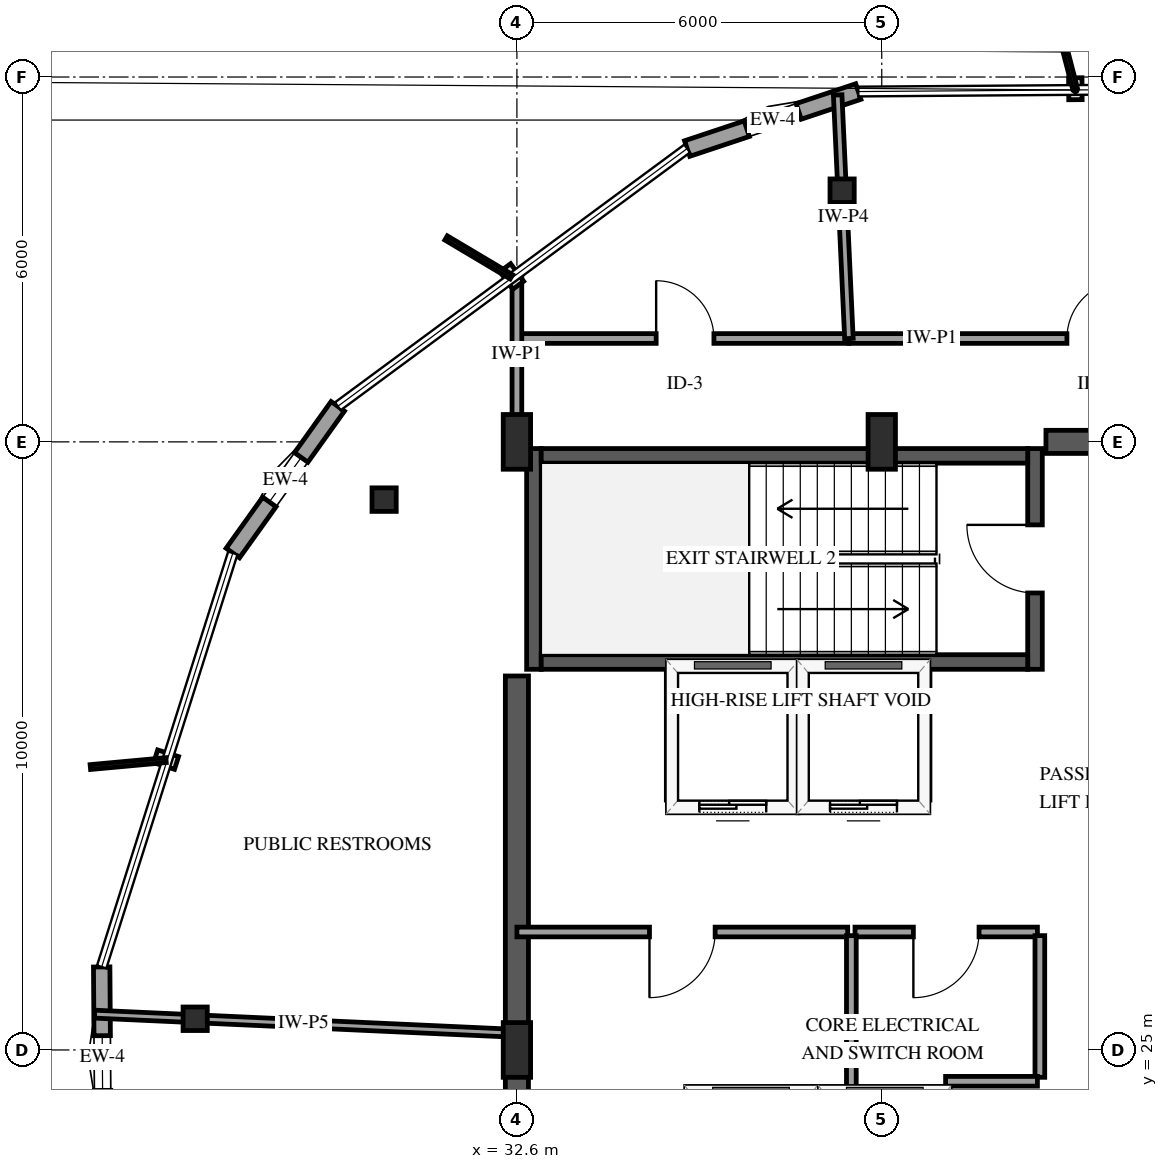
"""IFC4 building model, lengths in metres.
Left out: names, types, materials, properties, quantities, classifications, styles, units other than length and angle.
Written with IfcOpenShell. Run it as: python <this file> out.ifc"""

import sys

from ifc_helpers import new_model, si_unit, direction, frame, frame_2d, origin, origin_2d, place, context, subcontext, project, spatial, rectangle, i_section, extrude, element, fill, save


model = new_model("IFC4")
c1 = context("Model", 3, precision=1e-05, world=origin(), true_north=direction((0.0, 1.0)))
c2 = subcontext(c1, "Body", "Model", "MODEL_VIEW")
j1 = project(units=[si_unit("LENGTHUNIT", "METRE"), si_unit("PLANEANGLEUNIT", "RADIAN")], contexts=[c1])
p1 = place(None, origin())
s1 = spatial("IfcSite", under=j1, at=p1, CompositionType="ELEMENT")
p2 = place(p1, origin())
s2 = spatial("IfcBuilding", under=s1, at=p2, CompositionType="ELEMENT")
p3 = place(p2, frame((0.0, 0.0, 301.45)))
s3 = spatial("IfcBuildingStorey", under=s2, at=p3, CompositionType="ELEMENT", Elevation=301.45)
p4 = place(p3, frame((32.88, 31.26, 0.0), z_axis=(0.0, 0.0, 1.0), x_axis=(0.0, 1.0, 0.0)))
e1 = element("IfcWall", 1, at=p4, inside=s3, PredefinedType="SHEAR", context=c2, shape_type="SweptSolid", body=[
    extrude(rectangle(XDim=3.63, YDim=0.24, at=frame_2d((1.815, 0.0))), origin(), (0.0, 0.0, 1.0), 4.2),
])
p5 = place(p3, frame((41.12, 31.26, 0.0), z_axis=(0.0, 0.0, 1.0), x_axis=(0.0, 1.0, 0.0)))
e2 = element("IfcWall", 2, at=p5, inside=s3, PredefinedType="SHEAR", context=c2, shape_type="SweptSolid", body=[
    extrude(rectangle(XDim=3.63, YDim=0.24, at=frame_2d((1.815, 0.0))), origin(), (0.0, 0.0, 1.0), 4.2),
])
p6 = place(p5, frame((1.255, 0.0, 0.0)))
e3 = element("IfcOpeningElement", 3, at=p6, cuts=e2, PredefinedType="OPENING", context=c2, shape_type="SweptSolid", body=[
    extrude(rectangle(XDim=1.12, YDim=2.15, at=frame_2d((0.56, 1.075))), frame((0.0, 0.13, 0.0), z_axis=(0.0, -1.0, 0.0), x_axis=(1.0, 0.0, 0.0)), (0.0, 0.0, 1.0), 0.26),
])
for number, where, z_axis, x_axis in (
    (4, (33.0, 31.38, 0.0), (0.0, 0.0, 1.0), (1.0, 0.0, 0.0)),
    (5, (33.0, 34.77, 0.0), (0.0, 0.0, 1.0), (1.0, 0.0, 0.0)),
):
    element("IfcWall", number, at=place(p3, frame(where, z_axis=z_axis, x_axis=x_axis)), inside=s3, PredefinedType="SHEAR", context=c2, shape_type="SweptSolid", body=[
        extrude(rectangle(XDim=8.0, YDim=0.24, at=frame_2d((4.0, 0.0))), origin(), (0.0, 0.0, 1.0), 4.2),
    ])
p7 = place(p3, frame((32.6, 18.85, 0.0), z_axis=(0.0, 0.0, 1.0), x_axis=(0.0, 1.0, 0.0)))
e6 = element("IfcWall", 6, at=p7, inside=s3, PredefinedType="SHEAR", context=c2, shape_type="SweptSolid", body=[
    extrude(rectangle(XDim=12.3, YDim=0.38, at=frame_2d((6.15, 0.0))), origin(), (0.0, 0.0, 1.0), 4.2),
])
p8 = place(p3, frame((41.3, 35.0, 0.0), z_axis=(0.0, 0.0, 1.0), x_axis=(1.0, 0.0, 0.0)))
e7 = element("IfcWall", 7, at=p8, inside=s3, PredefinedType="SHEAR", context=c2, shape_type="SweptSolid", body=[
    extrude(rectangle(XDim=2.85, YDim=0.38, at=frame_2d((1.425, 0.0))), origin(), (0.0, 0.0, 1.0), 4.2),
])
for number, where, z_axis, x_axis in (
    (8, (32.6, 25.0, 0.0), (0.0, 0.0, 1.0), (1.0, 0.0, 0.0)),
    (9, (32.6, 35.0, 0.0), (0.0, 0.0, 1.0), (1.0, 0.0, 0.0)),
    (10, (38.6, 35.0, 0.0), (0.0, 0.0, 1.0), (1.0, 0.0, 0.0)),
):
    element("IfcColumn", number, at=place(p3, frame(where, z_axis=z_axis, x_axis=x_axis)), inside=s3, PredefinedType="PILASTER", context=c2, shape_type="SweptSolid", body=[
        extrude(rectangle(XDim=0.45, YDim=0.9, at=origin_2d()), origin(), (0.0, 0.0, 1.0), 4.2),
    ])
for number, where, z_axis, x_axis in (
    (11, (37.948, 39.131, 0.0), (0.0, 0.0, 1.0), (1.0, 0.0, 0.0)),
    (12, (30.416, 34.05, 0.0), (0.0, 0.0, 1.0), (1.0, 0.0, 0.0)),
    (13, (27.309, 25.513, 0.0), (0.0, 0.0, 1.0), (1.0, 0.0, 0.0)),
):
    element("IfcColumn", number, at=place(p3, frame(where, z_axis=z_axis, x_axis=x_axis)), inside=s3, PredefinedType="COLUMN", context=c2, shape_type="SweptSolid", body=[
        extrude(i_section(OverallWidth=0.398, OverallDepth=0.387, WebThickness=0.021, FlangeThickness=0.033, FilletRadius=0.038, at=origin_2d()), origin(), (0.0, 0.0, 1.0), 4.2),
    ])
p9 = place(p3, frame((38.214, 40.761, 0.0), z_axis=(0.0, 0.0, 1.0), x_axis=(-0.948757335835, -0.31600556593, 0.0)))
e14 = element("IfcWall", 14, at=p9, inside=s3, PredefinedType="SOLIDWALL", context=c2, shape_type="SweptSolid", body=[
    extrude(rectangle(XDim=2.967, YDim=0.27, at=frame_2d((1.483, 0.0))), origin(), (0.0, 0.0, 1.0), 3.274),
])
p10 = place(p9, frame((1.033, 0.0, 0.75)))
e15 = element("IfcOpeningElement", 15, at=p10, cuts=e14, PredefinedType="OPENING", context=c2, shape_type="SweptSolid", body=[
    extrude(rectangle(XDim=0.9, YDim=1.5, at=frame_2d((0.45, 0.75))), frame((0.0, 0.145, 0.0), z_axis=(0.0, -1.0, 0.0), x_axis=(1.0, 0.0, 0.0)), (0.0, 0.0, 1.0), 0.29),
])
p11 = place(p3, frame((29.654, 35.584, 0.0), z_axis=(0.0, 0.0, 1.0), x_axis=(-0.581915266528, -0.813249422122, 0.0)))
e16 = element("IfcWall", 16, at=p11, inside=s3, PredefinedType="SOLIDWALL", context=c2, shape_type="SweptSolid", body=[
    extrude(rectangle(XDim=2.967, YDim=0.27, at=frame_2d((1.483, 0.0))), origin(), (0.0, 0.0, 1.0), 3.274),
])
p12 = place(p11, frame((1.033, 0.0, 0.75)))
e17 = element("IfcOpeningElement", 17, at=p12, cuts=e16, PredefinedType="OPENING", context=c2, shape_type="SweptSolid", body=[
    extrude(rectangle(XDim=0.9, YDim=1.5, at=frame_2d((0.45, 0.75))), frame((0.0, 0.145, 0.0), z_axis=(0.0, -1.0, 0.0), x_axis=(1.0, 0.0, 0.0)), (0.0, 0.0, 1.0), 0.29),
])
p13 = place(p3, frame((25.771, 26.365, 0.0), z_axis=(0.0, 0.0, 1.0), x_axis=(0.007324906367, -0.999973172514, 0.0)))
e18 = element("IfcWall", 18, at=p13, inside=s3, PredefinedType="SOLIDWALL", context=c2, shape_type="SweptSolid", body=[
    extrude(rectangle(XDim=2.966, YDim=0.27, at=frame_2d((1.483, 0.0))), origin(), (0.0, 0.0, 1.0), 3.274),
])
p14 = place(p13, frame((1.131, 0.0, 0.75)))
e19 = element("IfcOpeningElement", 19, at=p14, cuts=e18, PredefinedType="OPENING", context=c2, shape_type="SweptSolid", body=[
    extrude(rectangle(XDim=0.9, YDim=1.5, at=frame_2d((0.45, 0.75))), frame((0.0, 0.145, 0.0), z_axis=(0.0, -1.0, 0.0), x_axis=(1.0, 0.0, 0.0)), (0.0, 0.0, 1.0), 0.29),
])
for number, where, z_axis, x_axis in (
    (20, (35.45, 24.3, 0.0), (0.0, 0.0, 1.0), (1.0, 0.0, 0.0)),
    (21, (37.65, 24.3, 0.0), (0.0, 0.0, 1.0), (1.0, 0.0, 0.0)),
):
    element("IfcWall", number, at=place(p3, frame(where, z_axis=z_axis, x_axis=x_axis)), inside=s3, PredefinedType="SOLIDWALL", context=c2, shape_type="SweptSolid", body=[
        extrude(rectangle(XDim=2.0, YDim=0.185, at=frame_2d((1.0, 0.0))), origin(), (0.0, 0.0, 1.0), 3.895),
    ])
p15 = place(p3, frame((35.15, 29.0, 0.0), z_axis=(0.0, 0.0, 1.0), x_axis=(1.0, 0.0, 0.0)))
e22 = element("IfcWall", 22, at=p15, inside=s3, PredefinedType="SOLIDWALL", context=c2, shape_type="SweptSolid", body=[
    extrude(rectangle(XDim=2.0, YDim=0.185, at=frame_2d((1.0, 0.0))), origin(), (0.0, 0.0, 1.0), 3.895),
])
p16 = place(p15, frame((0.45, 0.0, 0.0)))
e23 = element("IfcOpeningElement", 23, at=p16, cuts=e22, PredefinedType="OPENING", context=c2, shape_type="SweptSolid", body=[
    extrude(rectangle(XDim=1.1, YDim=2.15, at=frame_2d((0.55, 1.075))), frame((0.0, 0.103, 0.0), z_axis=(0.0, -1.0, 0.0), x_axis=(1.0, 0.0, 0.0)), (0.0, 0.0, 1.0), 0.205),
])
for number, where, z_axis, x_axis in (
    (24, (35.15, 29.11, 0.0), (0.0, 0.0, 1.0), (0.0, 1.0, 0.0)),
    (25, (37.15, 29.11, 0.0), (0.0, 0.0, 1.0), (0.0, 1.0, 0.0)),
):
    element("IfcWall", number, at=place(p3, frame(where, z_axis=z_axis, x_axis=x_axis)), inside=s3, PredefinedType="SOLIDWALL", context=c2, shape_type="SweptSolid", body=[
        extrude(rectangle(XDim=2.1, YDim=0.185, at=frame_2d((1.05, 0.0))), origin(), (0.0, 0.0, 1.0), 3.895),
    ])
p17 = place(p3, frame((37.3, 29.0, 0.0), z_axis=(0.0, 0.0, 1.0), x_axis=(1.0, 0.0, 0.0)))
e26 = element("IfcWall", 26, at=p17, inside=s3, PredefinedType="SOLIDWALL", context=c2, shape_type="SweptSolid", body=[
    extrude(rectangle(XDim=2.0, YDim=0.185, at=frame_2d((1.0, 0.0))), origin(), (0.0, 0.0, 1.0), 3.895),
])
p18 = place(p17, frame((0.45, 0.0, 0.0)))
e27 = element("IfcOpeningElement", 27, at=p18, cuts=e26, PredefinedType="OPENING", context=c2, shape_type="SweptSolid", body=[
    extrude(rectangle(XDim=1.1, YDim=2.15, at=frame_2d((0.55, 1.075))), frame((0.0, 0.103, 0.0), z_axis=(0.0, -1.0, 0.0), x_axis=(1.0, 0.0, 0.0)), (0.0, 0.0, 1.0), 0.205),
])
p19 = place(p3, frame((39.3, 29.11, 0.0), z_axis=(0.0, 0.0, 1.0), x_axis=(0.0, 1.0, 0.0)))
e28 = element("IfcWall", 28, at=p19, inside=s3, PredefinedType="SOLIDWALL", context=c2, shape_type="SweptSolid", body=[
    extrude(rectangle(XDim=2.1, YDim=0.185, at=frame_2d((1.05, 0.0))), origin(), (0.0, 0.0, 1.0), 3.895),
])
p20 = place(p3, frame((38.06, 36.7, 0.0), z_axis=(0.0, 0.0, 1.0), x_axis=(1.0, 0.0, 0.0)))
e29 = element("IfcWall", 29, at=p20, inside=s3, PredefinedType="PARTITIONING", context=c2, shape_type="SweptSolid", body=[
    extrude(rectangle(XDim=8.12, YDim=0.16, at=frame_2d((4.06, 0.0))), origin(), (0.0, 0.0, 1.0), 3.895),
])
p21 = place(p20, frame((3.585, 0.0, 0.0)))
e30 = element("IfcOpeningElement", 30, at=p21, cuts=e29, PredefinedType="OPENING", context=c2, shape_type="SweptSolid", body=[
    extrude(rectangle(XDim=0.95, YDim=2.15, at=frame_2d((0.475, 1.075))), frame((0.0, 0.09, 0.0), z_axis=(0.0, -1.0, 0.0), x_axis=(1.0, 0.0, 0.0)), (0.0, 0.0, 1.0), 0.18),
])
p22 = place(p3, frame((32.527, 25.276, 0.0), z_axis=(0.0, 0.0, 1.0), x_axis=(-0.99896311896, 0.045526771868, 0.0)))
e31 = element("IfcWall", 31, at=p22, inside=s3, PredefinedType="PARTITIONING", context=c2, shape_type="SweptSolid", body=[
    extrude(rectangle(XDim=6.88, YDim=0.13, at=frame_2d((3.44, 0.0))), origin(), (0.0, 0.0, 1.0), 3.19),
])
p23 = place(p3, frame((38.04, 26.94, 0.0), z_axis=(0.0, 0.0, 1.0), x_axis=(-1.0, 0.0, 0.0)))
e32 = element("IfcWall", 32, at=p23, inside=s3, PredefinedType="PARTITIONING", context=c2, shape_type="SweptSolid", body=[
    extrude(rectangle(XDim=5.44, YDim=0.16, at=frame_2d((2.72, 0.0))), origin(), (0.0, 0.0, 1.0), 3.895),
])
p24 = place(p23, frame((2.18, 0.0, 0.0)))
e33 = element("IfcOpeningElement", 33, at=p24, cuts=e32, PredefinedType="OPENING", context=c2, shape_type="SweptSolid", body=[
    extrude(rectangle(XDim=1.08, YDim=2.15, at=frame_2d((0.54, 1.075))), frame((0.0, 0.09, 0.0), z_axis=(0.0, -1.0, 0.0), x_axis=(1.0, 0.0, 0.0)), (0.0, 0.0, 1.0), 0.18),
])
p25 = place(p3, frame((32.67, 36.7, 0.0), z_axis=(0.0, 0.0, 1.0), x_axis=(1.0, 0.0, 0.0)))
e34 = element("IfcWall", 34, at=p25, inside=s3, PredefinedType="PARTITIONING", context=c2, shape_type="SweptSolid", body=[
    extrude(rectangle(XDim=5.39, YDim=0.16, at=frame_2d((2.695, 0.0))), origin(), (0.0, 0.0, 1.0), 3.895),
])
p26 = place(p25, frame((2.22, 0.0, 0.0)))
e35 = element("IfcOpeningElement", 35, at=p26, cuts=e34, PredefinedType="OPENING", context=c2, shape_type="SweptSolid", body=[
    extrude(rectangle(XDim=0.95, YDim=2.15, at=frame_2d((0.475, 1.075))), frame((0.0, 0.09, 0.0), z_axis=(0.0, -1.0, 0.0), x_axis=(1.0, 0.0, 0.0)), (0.0, 0.0, 1.0), 0.18),
])
p27 = place(p3, frame((38.06, 36.7, 0.0), z_axis=(0.0, 0.0, 1.0), x_axis=(-0.046156181076, 0.998934235547, 0.0)))
e36 = element("IfcWall", 36, at=p27, inside=s3, PredefinedType="PARTITIONING", context=c2, shape_type="SweptSolid", body=[
    extrude(rectangle(XDim=4.01, YDim=0.14, at=frame_2d((2.005, 0.0))), origin(), (0.0, 0.0, 1.0), 3.19),
])
p28 = place(p3, frame((41.16, 26.94, 0.0), z_axis=(0.0, 0.0, 1.0), x_axis=(-1.0, 0.0, 0.0)))
e37 = element("IfcWall", 37, at=p28, inside=s3, PredefinedType="PARTITIONING", context=c2, shape_type="SweptSolid", body=[
    extrude(rectangle(XDim=3.0, YDim=0.16, at=frame_2d((1.5, 0.0))), origin(), (0.0, 0.0, 1.0), 3.895),
])
p29 = place(p28, frame((0.96, 0.0, 0.0)))
e38 = element("IfcOpeningElement", 38, at=p29, cuts=e37, PredefinedType="OPENING", context=c2, shape_type="SweptSolid", body=[
    extrude(rectangle(XDim=1.08, YDim=2.15, at=frame_2d((0.54, 1.075))), frame((0.0, 0.09, 0.0), z_axis=(0.0, -1.0, 0.0), x_axis=(1.0, 0.0, 0.0)), (0.0, 0.0, 1.0), 0.18),
])
p30 = place(p3, frame((32.6, 35.12, 0.0), z_axis=(0.0, 0.0, 1.0), x_axis=(0.0, 1.0, 0.0)))
e39 = element("IfcWall", 39, at=p30, inside=s3, PredefinedType="PARTITIONING", context=c2, shape_type="SweptSolid", body=[
    extrude(rectangle(XDim=2.638, YDim=0.16, at=frame_2d((1.319, 0.0))), origin(), (0.0, 0.0, 1.0), 3.895),
])
p31 = place(p3, frame((38.1, 26.88, 0.0), z_axis=(0.0, 0.0, 1.0), x_axis=(0.0, -1.0, 0.0)))
e40 = element("IfcWall", 40, at=p31, inside=s3, PredefinedType="PARTITIONING", context=c2, shape_type="SweptSolid", body=[
    extrude(rectangle(XDim=2.58, YDim=0.16, at=frame_2d((1.29, 0.0))), origin(), (0.0, 0.0, 1.0), 3.895),
])
p32 = place(p3, frame((41.2, 24.55, 0.0), z_axis=(0.0, 0.0, 1.0), x_axis=(0.0, 1.0, 0.0)))
e41 = element("IfcWall", 41, at=p32, inside=s3, PredefinedType="PARTITIONING", context=c2, shape_type="SweptSolid", body=[
    extrude(rectangle(XDim=2.33, YDim=0.16, at=frame_2d((1.165, 0.0))), origin(), (0.0, 0.0, 1.0), 3.895),
])
p33 = place(p3, frame((39.65, 24.485, 0.0), z_axis=(0.0, 0.0, 1.0), x_axis=(1.0, 0.0, 0.0)))
e42 = element("IfcWall", 42, at=p33, inside=s3, PredefinedType="PARTITIONING", context=c2, shape_type="SweptSolid", body=[
    extrude(rectangle(XDim=1.51, YDim=0.16, at=frame_2d((0.755, 0.0))), origin(), (0.0, 0.0, 1.0), 3.895),
])
p34 = place(p10, origin())
e43 = element("IfcWindow", 43, at=p34, inside=s3, PartitioningType="SINGLE_PANEL", PredefinedType="WINDOW", context=c2, shape_type="SweptSolid", body=[
    extrude(rectangle(XDim=0.9, YDim=1.5, at=frame_2d((0.45, 0.75))), frame((0.0, 0.03, 0.0), z_axis=(0.0, -1.0, 0.0), x_axis=(1.0, 0.0, 0.0)), (0.0, 0.0, 1.0), 0.06),
])
fill(e15, e43)
p35 = place(p12, origin())
e44 = element("IfcWindow", 44, at=p35, inside=s3, PartitioningType="SINGLE_PANEL", PredefinedType="WINDOW", context=c2, shape_type="SweptSolid", body=[
    extrude(rectangle(XDim=0.9, YDim=1.5, at=frame_2d((0.45, 0.75))), frame((0.0, 0.03, 0.0), z_axis=(0.0, -1.0, 0.0), x_axis=(1.0, 0.0, 0.0)), (0.0, 0.0, 1.0), 0.06),
])
fill(e17, e44)
p36 = place(p14, origin())
e45 = element("IfcWindow", 45, at=p36, inside=s3, PartitioningType="SINGLE_PANEL", PredefinedType="WINDOW", context=c2, shape_type="SweptSolid", body=[
    extrude(rectangle(XDim=0.9, YDim=1.5, at=frame_2d((0.45, 0.75))), frame((0.0, 0.03, 0.0), z_axis=(0.0, -1.0, 0.0), x_axis=(1.0, 0.0, 0.0)), (0.0, 0.0, 1.0), 0.06),
])
fill(e19, e45)
p37 = place(p16, origin())
e46 = element("IfcDoor", 46, at=p37, inside=s3, OperationType="SLIDING_TO_LEFT", PredefinedType="DOOR", context=c2, shape_type="SweptSolid", body=[
    extrude(rectangle(XDim=1.1, YDim=2.15, at=frame_2d((0.55, 1.075))), frame((0.0, 0.025, 0.0), z_axis=(0.0, -1.0, 0.0), x_axis=(1.0, 0.0, 0.0)), (0.0, 0.0, 1.0), 0.05),
])
fill(e23, e46)
p38 = place(p18, origin())
e47 = element("IfcDoor", 47, at=p38, inside=s3, OperationType="SLIDING_TO_LEFT", PredefinedType="DOOR", context=c2, shape_type="SweptSolid", body=[
    extrude(rectangle(XDim=1.1, YDim=2.15, at=frame_2d((0.55, 1.075))), frame((0.0, 0.025, 0.0), z_axis=(0.0, -1.0, 0.0), x_axis=(1.0, 0.0, 0.0)), (0.0, 0.0, 1.0), 0.05),
])
fill(e27, e47)
p39 = place(p6, origin())
e48 = element("IfcDoor", 48, at=p39, inside=s3, OperationType="SINGLE_SWING_RIGHT", PredefinedType="DOOR", context=c2, shape_type="SweptSolid", body=[
    extrude(rectangle(XDim=1.12, YDim=2.15, at=frame_2d((0.56, 1.075))), frame((0.0, 0.025, 0.0), z_axis=(0.0, -1.0, 0.0), x_axis=(1.0, 0.0, 0.0)), (0.0, 0.0, 1.0), 0.05),
])
fill(e3, e48)
p40 = place(p21, origin())
e49 = element("IfcDoor", 49, at=p40, inside=s3, OperationType="SINGLE_SWING_RIGHT", PredefinedType="DOOR", context=c2, shape_type="SweptSolid", body=[
    extrude(rectangle(XDim=0.95, YDim=2.15, at=frame_2d((0.475, 1.075))), frame((0.0, 0.025, 0.0), z_axis=(0.0, -1.0, 0.0), x_axis=(1.0, 0.0, 0.0)), (0.0, 0.0, 1.0), 0.05),
])
fill(e30, e49)
p41 = place(p24, origin())
e50 = element("IfcDoor", 50, at=p41, inside=s3, OperationType="SINGLE_SWING_RIGHT", PredefinedType="DOOR", context=c2, shape_type="SweptSolid", body=[
    extrude(rectangle(XDim=1.08, YDim=2.15, at=frame_2d((0.54, 1.075))), frame((0.0, 0.025, 0.0), z_axis=(0.0, -1.0, 0.0), x_axis=(1.0, 0.0, 0.0)), (0.0, 0.0, 1.0), 0.05),
])
fill(e33, e50)
p42 = place(p26, origin())
e51 = element("IfcDoor", 51, at=p42, inside=s3, OperationType="SINGLE_SWING_LEFT", PredefinedType="DOOR", context=c2, shape_type="SweptSolid", body=[
    extrude(rectangle(XDim=0.95, YDim=2.15, at=frame_2d((0.475, 1.075))), frame((0.0, 0.025, 0.0), z_axis=(0.0, -1.0, 0.0), x_axis=(1.0, 0.0, 0.0)), (0.0, 0.0, 1.0), 0.05),
])
fill(e35, e51)
p43 = place(p29, origin())
e52 = element("IfcDoor", 52, at=p43, inside=s3, OperationType="SINGLE_SWING_RIGHT", PredefinedType="DOOR", context=c2, shape_type="SweptSolid", body=[
    extrude(rectangle(XDim=1.08, YDim=2.15, at=frame_2d((0.54, 1.075))), frame((0.0, 0.025, 0.0), z_axis=(0.0, -1.0, 0.0), x_axis=(1.0, 0.0, 0.0)), (0.0, 0.0, 1.0), 0.05),
])
fill(e38, e52)
save(model, sys.argv[1])
